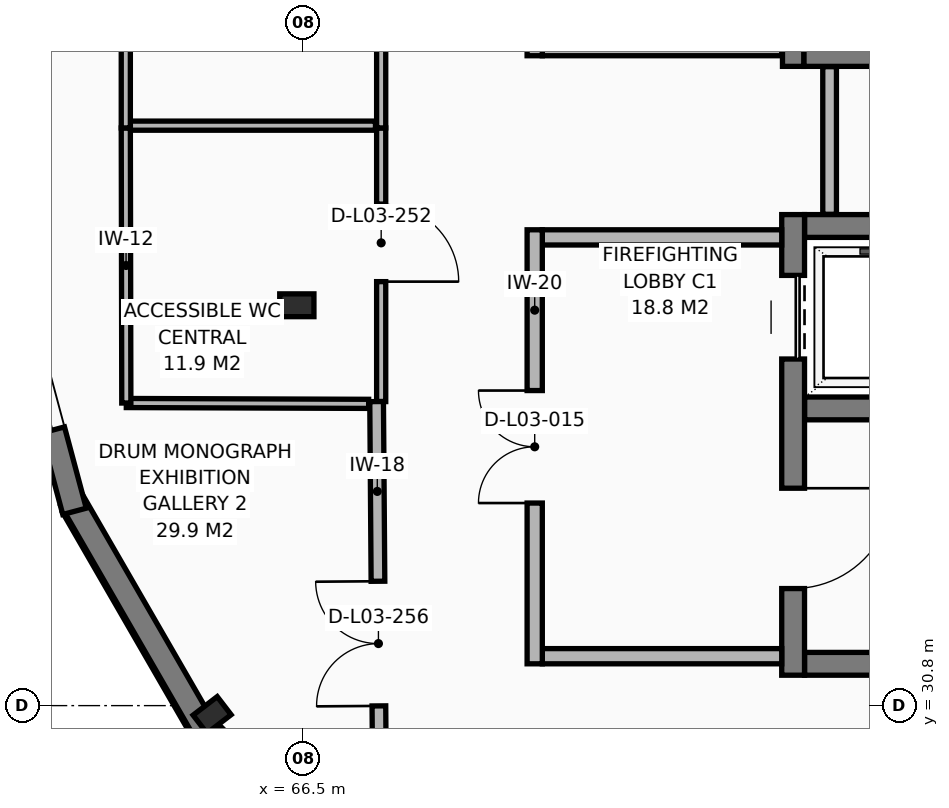
"""IFC4 building model, lengths in metres.
Left out: names, types, materials, properties, quantities, classifications, styles, units other than length and angle.
Written with IfcOpenShell. Run it as: python <this file> out.ifc"""

import sys

from ifc_helpers import new_model, si_unit, direction, frame, frame_2d, origin, origin_2d, place, context, subcontext, project, spatial, rectangle, i_section, extrude, element, fill, save


model = new_model("IFC4")
c1 = context("Model", 3, precision=1e-05, world=origin(), true_north=direction((0.0, 1.0)))
c2 = subcontext(c1, "Body", "Model", "MODEL_VIEW")
j1 = project(units=[si_unit("LENGTHUNIT", "METRE"), si_unit("PLANEANGLEUNIT", "RADIAN")], contexts=[c1])
p1 = place(None, origin())
s1 = spatial("IfcSite", under=j1, at=p1, CompositionType="ELEMENT")
p2 = place(p1, origin())
s2 = spatial("IfcBuilding", under=s1, at=p2, CompositionType="ELEMENT")
p3 = place(p2, frame((0.0, 0.0, 13.68)))
s3 = spatial("IfcBuildingStorey", under=s2, at=p3, CompositionType="ELEMENT", Elevation=13.68)
p4 = place(p3, frame((65.305, 30.677, 0.0), z_axis=(0.0, 0.0, 1.0), x_axis=(-0.793353340291, -0.608761429009, 0.0)))
e1 = element("IfcColumn", 1, at=p4, inside=s3, PredefinedType="COLUMN", context=c2, shape_type="SweptSolid", body=[
    extrude(i_section(OverallWidth=0.3, OverallDepth=0.4, WebThickness=0.013, FlangeThickness=0.024, FilletRadius=0.027, at=origin_2d()), origin(), (0.0, 0.0, 1.0), 3.96),
])
p5 = place(p3, frame((66.42, 36.067, 0.0), z_axis=(0.0, 0.0, 1.0), x_axis=(1.0, 0.0, 0.0)))
e2 = element("IfcColumn", 2, at=p5, inside=s3, PredefinedType="COLUMN", context=c2, shape_type="SweptSolid", body=[
    extrude(i_section(OverallWidth=0.3, OverallDepth=0.45, WebThickness=0.014, FlangeThickness=0.026, FilletRadius=0.027, at=origin_2d()), origin(), (0.0, 0.0, 1.0), 3.96),
])
p6 = place(p3, frame((67.676, 28.042, 0.0), z_axis=(0.0, 0.0, 1.0), x_axis=(-0.707072526286, 0.707141034428, 0.0)))
e3 = element("IfcWall", 3, at=p6, inside=s3, PredefinedType="SOLIDWALL", context=c2, shape_type="SweptSolid", body=[
    extrude(rectangle(XDim=3.564, YDim=0.32, at=frame_2d((1.782, 0.0))), origin(), (0.0, 0.0, 1.0), 3.76),
])
p7 = place(p6, frame((1.107, 0.0, 0.85)))
e4 = element("IfcOpeningElement", 4, at=p7, cuts=e3, PredefinedType="OPENING", context=c2, shape_type="SweptSolid", body=[
    extrude(rectangle(XDim=1.35, YDim=1.5, at=frame_2d((0.675, 0.75))), frame((0.0, 0.17, 0.0), z_axis=(0.0, -1.0, 0.0), x_axis=(1.0, 0.0, 0.0)), (0.0, 0.0, 1.0), 0.34),
])
p8 = place(p3, frame((65.236, 30.424, 0.0), z_axis=(0.0, 0.0, 1.0), x_axis=(-0.499926044331, 0.8660680979, 0.0)))
e5 = element("IfcWall", 5, at=p8, inside=s3, PredefinedType="SOLIDWALL", context=c2, shape_type="SweptSolid", body=[
    extrude(rectangle(XDim=3.564, YDim=0.32, at=frame_2d((1.782, 0.0))), origin(), (0.0, 0.0, 1.0), 3.76),
])
p9 = place(p3, frame((63.495, 33.356, 0.0), z_axis=(0.0, 0.0, 1.0), x_axis=(-0.258830827966, 0.965922669003, 0.0)))
e6 = element("IfcWall", 6, at=p9, inside=s3, PredefinedType="SOLIDWALL", context=c2, shape_type="SweptSolid", body=[
    extrude(rectangle(XDim=3.563, YDim=0.32, at=frame_2d((1.782, 0.0))), origin(), (0.0, 0.0, 1.0), 3.76),
])
p10 = place(p9, frame((1.107, 0.0, 0.85)))
e7 = element("IfcOpeningElement", 7, at=p10, cuts=e6, PredefinedType="OPENING", context=c2, shape_type="SweptSolid", body=[
    extrude(rectangle(XDim=1.35, YDim=1.5, at=frame_2d((0.675, 0.75))), frame((0.0, 0.17, 0.0), z_axis=(0.0, -1.0, 0.0), x_axis=(1.0, 0.0, 0.0)), (0.0, 0.0, 1.0), 0.34),
])
for number, where, z_axis, x_axis in (
    (8, (73.1, 31.35, 0.0), (0.0, 0.0, 1.0), (1.0, 0.0, 0.0)),
    (9, (80.8, 34.71, 0.0), (0.0, 0.0, 1.0), (-1.0, 0.0, 0.0)),
):
    element("IfcWall", number, at=place(p3, frame(where, z_axis=z_axis, x_axis=x_axis)), inside=s3, PredefinedType="SHEAR", context=c2, shape_type="SweptSolid", body=[
        extrude(rectangle(XDim=7.7, YDim=0.3, at=frame_2d((3.85, 0.0))), origin(), (0.0, 0.0, 1.0), 3.76),
    ])
p11 = place(p3, frame((76.3, 37.11, 0.0), z_axis=(0.0, 0.0, 1.0), x_axis=(-1.0, 0.0, 0.0)))
e10 = element("IfcWall", 10, at=p11, inside=s3, PredefinedType="SHEAR", context=c2, shape_type="SweptSolid", body=[
    extrude(rectangle(XDim=3.2, YDim=0.3, at=frame_2d((1.6, 0.0))), origin(), (0.0, 0.0, 1.0), 3.76),
])
p12 = place(p3, frame((72.95, 37.26, 0.0), z_axis=(0.0, 0.0, 1.0), x_axis=(0.0, -1.0, 0.0)))
e11 = element("IfcWall", 11, at=p12, inside=s3, PredefinedType="SHEAR", context=c2, shape_type="SweptSolid", body=[
    extrude(rectangle(XDim=6.06, YDim=0.3, at=frame_2d((3.03, 0.0))), origin(), (0.0, 0.0, 1.0), 3.76),
])
p13 = place(p12, frame((0.8, 0.0, 0.0)))
e12 = element("IfcOpeningElement", 12, at=p13, cuts=e11, PredefinedType="OPENING", context=c2, shape_type="SweptSolid", body=[
    extrude(rectangle(XDim=1.1, YDim=2.12, at=frame_2d((0.55, 1.06))), frame((0.0, 0.16, 0.0), z_axis=(0.0, -1.0, 0.0), x_axis=(1.0, 0.0, 0.0)), (0.0, 0.0, 1.0), 0.32),
])
p14 = place(p12, frame((3.6, 0.0, 0.0)))
e13 = element("IfcOpeningElement", 13, at=p14, cuts=e11, PredefinedType="OPENING", context=c2, shape_type="SweptSolid", body=[
    extrude(rectangle(XDim=1.32, YDim=2.12, at=frame_2d((0.66, 1.06))), frame((0.0, 0.16, 0.0), z_axis=(0.0, -1.0, 0.0), x_axis=(1.0, 0.0, 0.0)), (0.0, 0.0, 1.0), 0.32),
])
p15 = place(p3, frame((69.65, 31.45, 0.0), z_axis=(0.0, 0.0, 1.0), x_axis=(1.0, 0.0, 0.0)))
e14 = element("IfcWall", 14, at=p15, inside=s3, PredefinedType="PARTITIONING", context=c2, shape_type="SweptSolid", body=[
    extrude(rectangle(XDim=3.15, YDim=0.2, at=frame_2d((1.575, 0.0))), origin(), (0.0, 0.0, 1.0), 3.15),
])
p16 = place(p3, frame((72.8, 36.96, 0.0), z_axis=(0.0, 0.0, 1.0), x_axis=(-1.0, 0.0, 0.0)))
e15 = element("IfcWall", 15, at=p16, inside=s3, PredefinedType="PARTITIONING", context=c2, shape_type="SweptSolid", body=[
    extrude(rectangle(XDim=3.15, YDim=0.2, at=frame_2d((1.575, 0.0))), origin(), (0.0, 0.0, 1.0), 3.76),
])
p17 = place(p3, frame((69.55, 31.35, 0.0), z_axis=(0.0, 0.0, 1.0), x_axis=(0.0, 1.0, 0.0)))
e16 = element("IfcWall", 16, at=p17, inside=s3, PredefinedType="PARTITIONING", context=c2, shape_type="SweptSolid", body=[
    extrude(rectangle(XDim=5.71, YDim=0.2, at=frame_2d((2.855, 0.0))), origin(), (0.0, 0.0, 1.0), 3.15),
])
p18 = place(p17, frame((2.115, 0.0, 0.0)))
e17 = element("IfcOpeningElement", 17, at=p18, cuts=e16, PredefinedType="OPENING", context=c2, shape_type="SweptSolid", body=[
    extrude(rectangle(XDim=1.48, YDim=2.15, at=frame_2d((0.74, 1.075))), frame((0.0, 0.11, 0.0), z_axis=(0.0, -1.0, 0.0), x_axis=(1.0, 0.0, 0.0)), (0.0, 0.0, 1.0), 0.22),
])
p19 = place(p3, frame((73.09, 39.35, 0.0), z_axis=(0.0, 0.0, 1.0), x_axis=(1.0, 0.0, 0.0)))
e18 = element("IfcWall", 18, at=p19, inside=s3, PredefinedType="SHEAR", context=c2, shape_type="SweptSolid", body=[
    extrude(rectangle(XDim=7.7, YDim=0.28, at=frame_2d((3.85, 0.0))), origin(), (0.0, 0.0, 1.0), 3.76),
])
p20 = place(p3, frame((72.95, 45.25, 0.0), z_axis=(0.0, 0.0, 1.0), x_axis=(0.0, -1.0, 0.0)))
e19 = element("IfcWall", 19, at=p20, inside=s3, PredefinedType="SHEAR", context=c2, shape_type="SweptSolid", body=[
    extrude(rectangle(XDim=6.04, YDim=0.28, at=frame_2d((3.02, 0.0))), origin(), (0.0, 0.0, 1.0), 3.76),
])
p21 = place(p20, frame((0.8, 0.0, 0.0)))
e20 = element("IfcOpeningElement", 20, at=p21, cuts=e19, PredefinedType="OPENING", context=c2, shape_type="SweptSolid", body=[
    extrude(rectangle(XDim=1.1, YDim=2.12, at=frame_2d((0.55, 1.06))), frame((0.0, 0.15, 0.0), z_axis=(0.0, -1.0, 0.0), x_axis=(1.0, 0.0, 0.0)), (0.0, 0.0, 1.0), 0.3),
])
p22 = place(p20, frame((3.6, 0.0, 0.0)))
e21 = element("IfcOpeningElement", 21, at=p22, cuts=e19, PredefinedType="OPENING", context=c2, shape_type="SweptSolid", body=[
    extrude(rectangle(XDim=1.32, YDim=2.12, at=frame_2d((0.66, 1.06))), frame((0.0, 0.15, 0.0), z_axis=(0.0, -1.0, 0.0), x_axis=(1.0, 0.0, 0.0)), (0.0, 0.0, 1.0), 0.3),
])
p23 = place(p3, frame((69.65, 39.45, 0.0), z_axis=(0.0, 0.0, 1.0), x_axis=(1.0, 0.0, 0.0)))
e22 = element("IfcWall", 22, at=p23, inside=s3, PredefinedType="PARTITIONING", context=c2, shape_type="SweptSolid", body=[
    extrude(rectangle(XDim=3.15, YDim=0.2, at=frame_2d((1.575, 0.0))), origin(), (0.0, 0.0, 1.0), 3.76),
])
p24 = place(p3, frame((69.55, 39.35, 0.0), z_axis=(0.0, 0.0, 1.0), x_axis=(0.0, 1.0, 0.0)))
e23 = element("IfcWall", 23, at=p24, inside=s3, PredefinedType="PARTITIONING", context=c2, shape_type="SweptSolid", body=[
    extrude(rectangle(XDim=5.71, YDim=0.2, at=frame_2d((2.855, 0.0))), origin(), (0.0, 0.0, 1.0), 3.15),
])
p25 = place(p24, frame((2.115, 0.0, 0.0)))
e24 = element("IfcOpeningElement", 24, at=p25, cuts=e23, PredefinedType="OPENING", context=c2, shape_type="SweptSolid", body=[
    extrude(rectangle(XDim=1.48, YDim=2.15, at=frame_2d((0.74, 1.075))), frame((0.0, 0.11, 0.0), z_axis=(0.0, -1.0, 0.0), x_axis=(1.0, 0.0, 0.0)), (0.0, 0.0, 1.0), 0.22),
])
p26 = place(p3, frame((67.53, 38.4, 0.0), z_axis=(0.0, 0.0, 1.0), x_axis=(0.0, -1.0, 0.0)))
e25 = element("IfcWall", 25, at=p26, inside=s3, PredefinedType="PARTITIONING", context=c2, shape_type="SweptSolid", body=[
    extrude(rectangle(XDim=3.6, YDim=0.12, at=frame_2d((1.8, 0.0))), origin(), (0.0, 0.0, 1.0), 3.15),
])
p27 = place(p26, frame((1.002, 0.0, 0.0)))
e26 = element("IfcOpeningElement", 26, at=p27, cuts=e25, PredefinedType="OPENING", context=c2, shape_type="SweptSolid", body=[
    extrude(rectangle(XDim=1.02, YDim=2.12, at=frame_2d((0.51, 1.06))), frame((0.0, 0.07, 0.0), z_axis=(0.0, -1.0, 0.0), x_axis=(1.0, 0.0, 0.0)), (0.0, 0.0, 1.0), 0.14),
])
p28 = place(p3, frame((67.53, 42.0, 0.0), z_axis=(0.0, 0.0, 1.0), x_axis=(0.0, -1.0, 0.0)))
e27 = element("IfcWall", 27, at=p28, inside=s3, PredefinedType="PARTITIONING", context=c2, shape_type="SweptSolid", body=[
    extrude(rectangle(XDim=3.6, YDim=0.12, at=frame_2d((1.8, 0.0))), origin(), (0.0, 0.0, 1.0), 3.15),
])
p29 = place(p28, frame((1.32, 0.0, 0.0)))
e28 = element("IfcOpeningElement", 28, at=p29, cuts=e27, PredefinedType="OPENING", context=c2, shape_type="SweptSolid", body=[
    extrude(rectangle(XDim=0.96, YDim=2.1, at=frame_2d((0.48, 1.05))), frame((0.0, 0.07, 0.0), z_axis=(0.0, -1.0, 0.0), x_axis=(1.0, 0.0, 0.0)), (0.0, 0.0, 1.0), 0.14),
])
p30 = place(p3, frame((73.43, 39.206, 0.0), z_axis=(0.0, 0.0, 1.0), x_axis=(0.0, -1.0, 0.0)))
e29 = element("IfcWall", 29, at=p30, inside=s3, PredefinedType="PARTITIONING", context=c2, shape_type="SweptSolid", body=[
    extrude(rectangle(XDim=1.942, YDim=0.18, at=frame_2d((0.971, 0.0))), origin(), (0.0, 0.0, 1.0), 3.75),
])
p31 = place(p3, frame((67.518, 28.433, 0.0), z_axis=(0.0, 0.0, 1.0), x_axis=(-0.007476498212, 0.999972050597, 0.0)))
e30 = element("IfcWall", 30, at=p31, inside=s3, PredefinedType="PARTITIONING", context=c2, shape_type="SweptSolid", body=[
    extrude(rectangle(XDim=6.368, YDim=0.18, at=frame_2d((3.184, 0.0))), origin(), (0.0, 0.0, 1.0), 3.15),
])
p32 = place(p31, frame((2.364, 0.0, 0.0)))
e31 = element("IfcOpeningElement", 31, at=p32, cuts=e30, PredefinedType="OPENING", context=c2, shape_type="SweptSolid", body=[
    extrude(rectangle(XDim=1.64, YDim=2.2, at=frame_2d((0.82, 1.1))), frame((0.0, 0.1, 0.0), z_axis=(0.0, -1.0, 0.0), x_axis=(1.0, 0.0, 0.0)), (0.0, 0.0, 1.0), 0.2),
])
p33 = place(p3, frame((64.2, 38.43, 0.0), z_axis=(0.0, 0.0, 1.0), x_axis=(1.0, 0.0, 0.0)))
e32 = element("IfcWall", 32, at=p33, inside=s3, PredefinedType="PARTITIONING", context=c2, shape_type="SweptSolid", body=[
    extrude(rectangle(XDim=3.255, YDim=0.12, at=frame_2d((1.627, 0.0))), origin(), (0.0, 0.0, 1.0), 3.15),
])
p34 = place(p3, frame((67.365, 34.77, 0.0), z_axis=(0.0, 0.0, 1.0), x_axis=(-0.999994063851, 0.003445615075, 0.0)))
e33 = element("IfcWall", 33, at=p34, inside=s3, PredefinedType="PARTITIONING", context=c2, shape_type="SweptSolid", body=[
    extrude(rectangle(XDim=3.188, YDim=0.12, at=frame_2d((1.594, 0.0))), origin(), (0.0, 0.0, 1.0), 3.15),
])
p35 = place(p3, frame((64.177, 34.781, 0.0), z_axis=(0.0, 0.0, 1.0), x_axis=(-0.001888952982, 0.999998215927, 0.0)))
e34 = element("IfcWall", 34, at=p35, inside=s3, PredefinedType="PARTITIONING", context=c2, shape_type="SweptSolid", body=[
    extrude(rectangle(XDim=3.619, YDim=0.12, at=frame_2d((1.81, 0.0))), origin(), (0.0, 0.0, 1.0), 3.3),
])
p36 = place(p3, frame((64.17, 38.4, 0.0), z_axis=(0.0, 0.0, 1.0), x_axis=(0.0, 1.0, 0.0)))
e35 = element("IfcWall", 35, at=p36, inside=s3, PredefinedType="PARTITIONING", context=c2, shape_type="SweptSolid", body=[
    extrude(rectangle(XDim=3.6, YDim=0.12, at=frame_2d((1.8, 0.0))), origin(), (0.0, 0.0, 1.0), 3.75),
])
p37 = place(p10, origin())
e36 = element("IfcWindow", 36, at=p37, inside=s3, PartitioningType="SINGLE_PANEL", PredefinedType="WINDOW", context=c2, shape_type="SweptSolid", body=[
    extrude(rectangle(XDim=1.35, YDim=1.5, at=frame_2d((0.675, 0.75))), frame((0.0, 0.03, 0.0), z_axis=(0.0, -1.0, 0.0), x_axis=(1.0, 0.0, 0.0)), (0.0, 0.0, 1.0), 0.06),
])
fill(e7, e36)
p38 = place(p13, origin())
e37 = element("IfcDoor", 37, at=p38, inside=s3, OperationType="SLIDING_TO_LEFT", PredefinedType="DOOR", context=c2, shape_type="SweptSolid", body=[
    extrude(rectangle(XDim=1.1, YDim=2.12, at=frame_2d((0.55, 1.06))), frame((0.0, 0.025, 0.0), z_axis=(0.0, -1.0, 0.0), x_axis=(1.0, 0.0, 0.0)), (0.0, 0.0, 1.0), 0.05),
])
fill(e12, e37)
p39 = place(p14, origin())
e38 = element("IfcDoor", 38, at=p39, inside=s3, OperationType="SINGLE_SWING_LEFT", PredefinedType="DOOR", context=c2, shape_type="SweptSolid", body=[
    extrude(rectangle(XDim=1.32, YDim=2.12, at=frame_2d((0.66, 1.06))), frame((0.0, 0.025, 0.0), z_axis=(0.0, -1.0, 0.0), x_axis=(1.0, 0.0, 0.0)), (0.0, 0.0, 1.0), 0.05),
])
fill(e13, e38)
p40 = place(p18, origin())
e39 = element("IfcDoor", 39, at=p40, inside=s3, OperationType="DOUBLE_DOOR_SINGLE_SWING", PredefinedType="DOOR", context=c2, shape_type="SweptSolid", body=[
    extrude(rectangle(XDim=1.48, YDim=2.15, at=frame_2d((0.74, 1.075))), frame((0.0, 0.025, 0.0), z_axis=(0.0, -1.0, 0.0), x_axis=(1.0, 0.0, 0.0)), (0.0, 0.0, 1.0), 0.05),
])
fill(e17, e39)
p41 = place(p27, origin())
e40 = element("IfcDoor", 40, at=p41, inside=s3, OperationType="SINGLE_SWING_RIGHT", PredefinedType="DOOR", context=c2, shape_type="SweptSolid", body=[
    extrude(rectangle(XDim=1.02, YDim=2.12, at=frame_2d((0.51, 1.06))), frame((0.0, 0.025, 0.0), z_axis=(0.0, -1.0, 0.0), x_axis=(1.0, 0.0, 0.0)), (0.0, 0.0, 1.0), 0.05),
])
fill(e26, e40)
p42 = place(p32, origin())
e41 = element("IfcDoor", 41, at=p42, inside=s3, OperationType="DOUBLE_DOOR_SINGLE_SWING", PredefinedType="DOOR", context=c2, shape_type="SweptSolid", body=[
    extrude(rectangle(XDim=1.64, YDim=2.2, at=frame_2d((0.82, 1.1))), frame((0.0, 0.025, 0.0), z_axis=(0.0, -1.0, 0.0), x_axis=(1.0, 0.0, 0.0)), (0.0, 0.0, 1.0), 0.05),
])
fill(e31, e41)
save(model, sys.argv[1])
